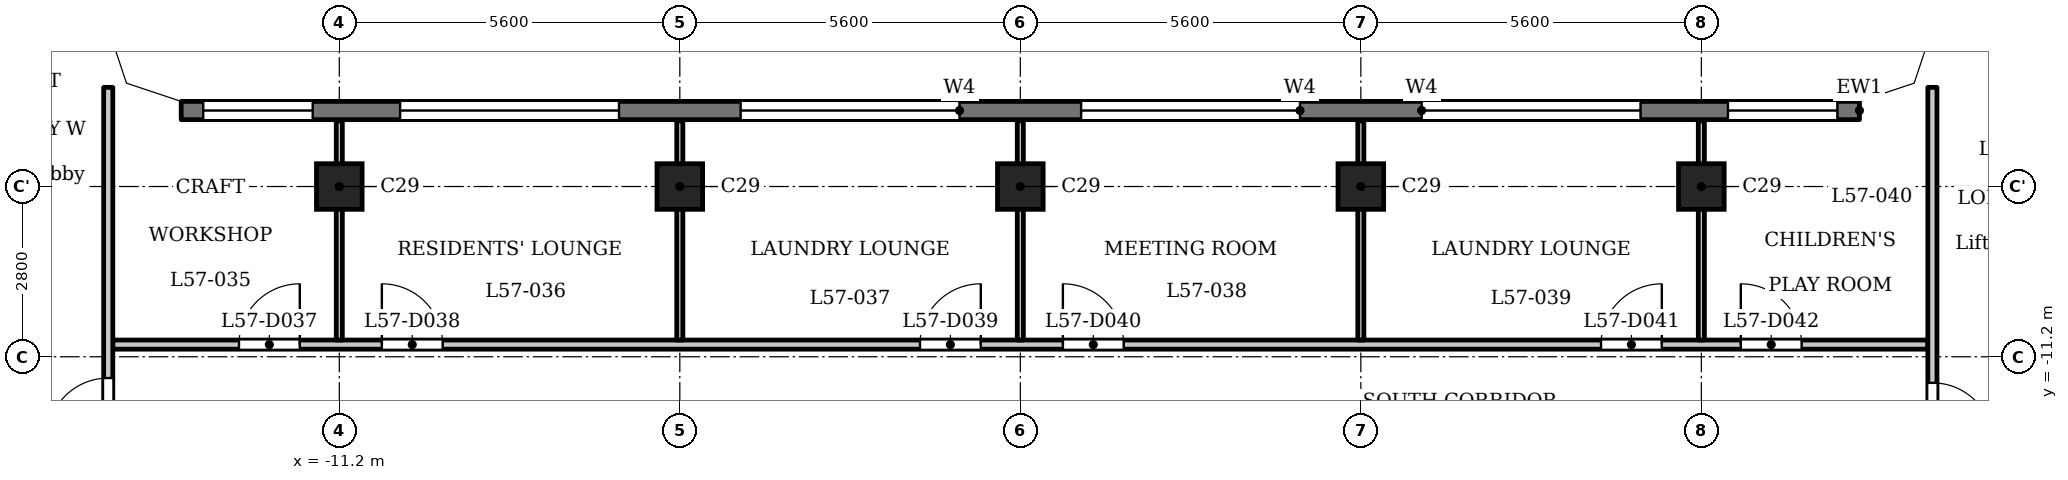
"""IFC4 building model, lengths in metres.
Left out: names, types, materials, properties, quantities, classifications, styles, units other than length and angle.
Written with IfcOpenShell. Run it as: python <this file> out.ifc"""

import sys

from ifc_helpers import new_model, si_unit, direction, frame, frame_2d, origin, origin_2d, place, context, subcontext, project, spatial, polyline, rectangle, outline, extrude, element, fill, save


model = new_model("IFC4")
c1 = context("Model", 3, precision=1e-05, world=origin(), true_north=direction((0.0, 1.0)))
c2 = subcontext(c1, "Body", "Model", "MODEL_VIEW")
j1 = project(units=[si_unit("LENGTHUNIT", "METRE"), si_unit("PLANEANGLEUNIT", "RADIAN")], contexts=[c1])
p1 = place(None, origin())
s1 = spatial("IfcSite", under=j1, at=p1, CompositionType="ELEMENT")
p2 = place(p1, origin())
s2 = spatial("IfcBuilding", under=s1, at=p2, CompositionType="ELEMENT")
p3 = place(p2, frame((0.0, 0.0, 220.4)))
s3 = spatial("IfcBuildingStorey", under=s2, at=p3, CompositionType="ELEMENT", Elevation=220.4)
for number, where, z_axis, x_axis in (
    (1, (-11.2, -8.4, 0.0), (0.0, 0.0, 1.0), (1.0, 0.0, 0.0)),
    (2, (-5.6, -8.4, 0.0), (0.0, 0.0, 1.0), (1.0, 0.0, 0.0)),
    (3, (0.0, -8.4, 0.0), (0.0, 0.0, 1.0), (1.0, 0.0, 0.0)),
    (4, (5.6, -8.4, 0.0), (0.0, 0.0, 1.0), (1.0, 0.0, 0.0)),
    (5, (11.2, -8.4, 0.0), (0.0, 0.0, 1.0), (1.0, 0.0, 0.0)),
):
    element("IfcColumn", number, at=place(p3, frame(where, z_axis=z_axis, x_axis=x_axis)), inside=s3, PredefinedType="COLUMN", context=c2, shape_type="SweptSolid", body=[
        extrude(rectangle(XDim=0.75, YDim=0.75, at=origin_2d()), origin(), (0.0, 0.0, 1.0), 3.5),
    ])
p4 = place(p3, frame((13.8, -7.15, 0.0), z_axis=(0.0, 0.0, 1.0), x_axis=(-1.0, 0.0, 0.0)))
e6 = element("IfcWall", 6, at=p4, inside=s3, PredefinedType="SOLIDWALL", context=c2, shape_type="SweptSolid", body=[
    extrude(rectangle(XDim=27.6, YDim=0.3, at=frame_2d((13.8, 0.0))), origin(), (0.0, 0.0, 1.0), 3.2),
])
p5 = place(p4, frame((0.363, 0.0, 0.9)))
e7 = element("IfcOpeningElement", 7, at=p5, cuts=e6, PredefinedType="OPENING", context=c2, shape_type="SweptSolid", body=[
    extrude(rectangle(XDim=1.8, YDim=1.25, at=frame_2d((0.9, 0.625))), frame((0.0, 0.16, 0.0), z_axis=(0.0, -1.0, 0.0), x_axis=(1.0, 0.0, 0.0)), (0.0, 0.0, 1.0), 0.32),
])
p6 = place(p4, frame((3.6, 0.0, 1.2)))
e8 = element("IfcOpeningElement", 8, at=p6, cuts=e6, PredefinedType="OPENING", context=c2, shape_type="SweptSolid", body=[
    extrude(rectangle(XDim=3.6, YDim=0.95, at=frame_2d((1.8, 0.475))), frame((0.0, 0.16, 0.0), z_axis=(0.0, -1.0, 0.0), x_axis=(1.0, 0.0, 0.0)), (0.0, 0.0, 1.0), 0.32),
])
p7 = place(p4, frame((9.2, 0.0, 1.2)))
e9 = element("IfcOpeningElement", 9, at=p7, cuts=e6, PredefinedType="OPENING", context=c2, shape_type="SweptSolid", body=[
    extrude(rectangle(XDim=3.6, YDim=0.95, at=frame_2d((1.8, 0.475))), frame((0.0, 0.16, 0.0), z_axis=(0.0, -1.0, 0.0), x_axis=(1.0, 0.0, 0.0)), (0.0, 0.0, 1.0), 0.32),
])
p8 = place(p4, frame((14.8, 0.0, 1.2)))
e10 = element("IfcOpeningElement", 10, at=p8, cuts=e6, PredefinedType="OPENING", context=c2, shape_type="SweptSolid", body=[
    extrude(rectangle(XDim=3.6, YDim=0.95, at=frame_2d((1.8, 0.475))), frame((0.0, 0.16, 0.0), z_axis=(0.0, -1.0, 0.0), x_axis=(1.0, 0.0, 0.0)), (0.0, 0.0, 1.0), 0.32),
])
p9 = place(p4, frame((20.4, 0.0, 1.2)))
e11 = element("IfcOpeningElement", 11, at=p9, cuts=e6, PredefinedType="OPENING", context=c2, shape_type="SweptSolid", body=[
    extrude(rectangle(XDim=3.6, YDim=0.95, at=frame_2d((1.8, 0.475))), frame((0.0, 0.16, 0.0), z_axis=(0.0, -1.0, 0.0), x_axis=(1.0, 0.0, 0.0)), (0.0, 0.0, 1.0), 0.32),
])
p10 = place(p4, frame((25.438, 0.0, 0.9)))
e12 = element("IfcOpeningElement", 12, at=p10, cuts=e6, PredefinedType="OPENING", context=c2, shape_type="SweptSolid", body=[
    extrude(rectangle(XDim=1.8, YDim=1.25, at=frame_2d((0.9, 0.625))), frame((0.0, 0.16, 0.0), z_axis=(0.0, -1.0, 0.0), x_axis=(1.0, 0.0, 0.0)), (0.0, 0.0, 1.0), 0.32),
])
p11 = place(p3, frame((-14.925, -11.0, 0.0), z_axis=(0.0, 0.0, 1.0), x_axis=(1.0, 0.0, 0.0)))
e13 = element("IfcWall", 13, at=p11, inside=s3, PredefinedType="PARTITIONING", context=c2, shape_type="SweptSolid", body=[
    extrude(rectangle(XDim=29.85, YDim=0.15, at=frame_2d((14.925, 0.0))), origin(), (0.0, 0.0, 1.0), 3.2),
])
p12 = place(p11, frame((2.075, 0.0, 0.0)))
e14 = element("IfcOpeningElement", 14, at=p12, cuts=e13, PredefinedType="OPENING", context=c2, shape_type="SweptSolid", body=[
    extrude(rectangle(XDim=1.0, YDim=2.1, at=frame_2d((0.5, 1.05))), frame((0.0, 0.085, 0.0), z_axis=(0.0, -1.0, 0.0), x_axis=(1.0, 0.0, 0.0)), (0.0, 0.0, 1.0), 0.17),
])
p13 = place(p11, frame((4.425, 0.0, 0.0)))
e15 = element("IfcOpeningElement", 15, at=p13, cuts=e13, PredefinedType="OPENING", context=c2, shape_type="SweptSolid", body=[
    extrude(rectangle(XDim=1.0, YDim=2.1, at=frame_2d((0.5, 1.05))), frame((0.0, 0.085, 0.0), z_axis=(0.0, -1.0, 0.0), x_axis=(1.0, 0.0, 0.0)), (0.0, 0.0, 1.0), 0.17),
])
p14 = place(p11, frame((13.275, 0.0, 0.0)))
e16 = element("IfcOpeningElement", 16, at=p14, cuts=e13, PredefinedType="OPENING", context=c2, shape_type="SweptSolid", body=[
    extrude(rectangle(XDim=1.0, YDim=2.1, at=frame_2d((0.5, 1.05))), frame((0.0, 0.085, 0.0), z_axis=(0.0, -1.0, 0.0), x_axis=(1.0, 0.0, 0.0)), (0.0, 0.0, 1.0), 0.17),
])
p15 = place(p11, frame((15.625, 0.0, 0.0)))
e17 = element("IfcOpeningElement", 17, at=p15, cuts=e13, PredefinedType="OPENING", context=c2, shape_type="SweptSolid", body=[
    extrude(rectangle(XDim=1.0, YDim=2.1, at=frame_2d((0.5, 1.05))), frame((0.0, 0.085, 0.0), z_axis=(0.0, -1.0, 0.0), x_axis=(1.0, 0.0, 0.0)), (0.0, 0.0, 1.0), 0.17),
])
p16 = place(p11, frame((24.475, 0.0, 0.0)))
e18 = element("IfcOpeningElement", 18, at=p16, cuts=e13, PredefinedType="OPENING", context=c2, shape_type="SweptSolid", body=[
    extrude(rectangle(XDim=1.0, YDim=2.1, at=frame_2d((0.5, 1.05))), frame((0.0, 0.085, 0.0), z_axis=(0.0, -1.0, 0.0), x_axis=(1.0, 0.0, 0.0)), (0.0, 0.0, 1.0), 0.17),
])
p17 = place(p11, frame((26.774, 0.0, 0.0)))
e19 = element("IfcOpeningElement", 19, at=p17, cuts=e13, PredefinedType="OPENING", context=c2, shape_type="SweptSolid", body=[
    extrude(rectangle(XDim=1.0, YDim=2.1, at=frame_2d((0.5, 1.05))), frame((0.0, 0.085, 0.0), z_axis=(0.0, -1.0, 0.0), x_axis=(1.0, 0.0, 0.0)), (0.0, 0.0, 1.0), 0.17),
])
p18 = place(p3, frame((-15.0, -13.125, 0.0), z_axis=(0.0, 0.0, 1.0), x_axis=(0.0, 1.0, 0.0)))
e20 = element("IfcWall", 20, at=p18, inside=s3, PredefinedType="PARTITIONING", context=c2, shape_type="SweptSolid", body=[
    extrude(rectangle(XDim=6.356, YDim=0.15, at=frame_2d((3.178, 0.0))), origin(), (0.0, 0.0, 1.0), 3.2),
])
p19 = place(p18, frame((0.575, 0.0, 0.0)))
e21 = element("IfcOpeningElement", 21, at=p19, cuts=e20, PredefinedType="OPENING", context=c2, shape_type="SweptSolid", body=[
    extrude(rectangle(XDim=1.0, YDim=2.1, at=frame_2d((0.5, 1.05))), frame((0.0, 0.085, 0.0), z_axis=(0.0, -1.0, 0.0), x_axis=(1.0, 0.0, 0.0)), (0.0, 0.0, 1.0), 0.17),
])
for number, where, z_axis, x_axis in (
    (22, (-11.2, -10.925, 0.0), (0.0, 0.0, 1.0), (0.0, 1.0, 0.0)),
    (23, (-5.6, -10.925, 0.0), (0.0, 0.0, 1.0), (0.0, 1.0, 0.0)),
    (24, (0.0, -10.925, 0.0), (0.0, 0.0, 1.0), (0.0, 1.0, 0.0)),
    (25, (5.6, -10.925, 0.0), (0.0, 0.0, 1.0), (0.0, 1.0, 0.0)),
    (26, (11.2, -10.925, 0.0), (0.0, 0.0, 1.0), (0.0, 1.0, 0.0)),
):
    element("IfcWall", number, at=place(p3, frame(where, z_axis=z_axis, x_axis=x_axis)), inside=s3, PredefinedType="PARTITIONING", context=c2, shape_type="SweptSolid", body=[
        extrude(rectangle(XDim=3.605, YDim=0.1, at=frame_2d((1.802, 0.0))), origin(), (0.0, 0.0, 1.0), 3.2),
    ])
p20 = place(p3, frame((15.0, -13.125, 0.0), z_axis=(0.0, 0.0, 1.0), x_axis=(0.0, 1.0, 0.0)))
e27 = element("IfcWall", 27, at=p20, inside=s3, PredefinedType="PARTITIONING", context=c2, shape_type="SweptSolid", body=[
    extrude(rectangle(XDim=6.356, YDim=0.15, at=frame_2d((3.178, 0.0))), origin(), (0.0, 0.0, 1.0), 3.2),
])
p21 = place(p20, frame((0.496, 0.0, 0.0)))
e28 = element("IfcOpeningElement", 28, at=p21, cuts=e27, PredefinedType="OPENING", context=c2, shape_type="SweptSolid", body=[
    extrude(rectangle(XDim=1.0, YDim=2.1, at=frame_2d((0.5, 1.05))), frame((0.0, 0.085, 0.0), z_axis=(0.0, -1.0, 0.0), x_axis=(1.0, 0.0, 0.0)), (0.0, 0.0, 1.0), 0.17),
])
p22 = place(p3, origin())
e29 = element("IfcWall", 29, at=p22, inside=s3, PredefinedType="SOLIDWALL", context=c2, shape_type="SweptSolid", body=[
    extrude(outline(polyline([(14.937, -6.937), (15.3, -5.849), (15.3, -5.8), (15.0, -5.8), (14.7, -6.7), (13.8, -7.0), (13.8, -7.3), (13.849, -7.3), (14.937, -6.937)])), origin(), (0.0, 0.0, 1.0), 3.2),
])
e30 = element("IfcWall", 30, at=p22, inside=s3, PredefinedType="SOLIDWALL", context=c2, shape_type="SweptSolid", body=[
    extrude(outline(polyline([(-14.937, -6.937), (-13.849, -7.3), (-13.8, -7.3), (-13.8, -7.0), (-14.7, -6.7), (-15.0, -5.8), (-15.3, -5.8), (-15.3, -5.849), (-14.937, -6.937)])), origin(), (0.0, 0.0, 1.0), 3.2),
])
p23 = place(p19, origin())
e31 = element("IfcDoor", 31, at=p23, inside=s3, OperationType="SINGLE_SWING_RIGHT", PredefinedType="DOOR", context=c2, shape_type="SweptSolid", body=[
    extrude(rectangle(XDim=1.0, YDim=2.1, at=frame_2d((0.5, 1.05))), frame((0.0, 0.025, 0.0), z_axis=(0.0, -1.0, 0.0), x_axis=(1.0, 0.0, 0.0)), (0.0, 0.0, 1.0), 0.05),
])
fill(e21, e31)
p24 = place(p21, origin())
e32 = element("IfcDoor", 32, at=p24, inside=s3, OperationType="SINGLE_SWING_LEFT", PredefinedType="DOOR", context=c2, shape_type="SweptSolid", body=[
    extrude(rectangle(XDim=1.0, YDim=2.1, at=frame_2d((0.5, 1.05))), frame((0.0, 0.025, 0.0), z_axis=(0.0, -1.0, 0.0), x_axis=(1.0, 0.0, 0.0)), (0.0, 0.0, 1.0), 0.05),
])
fill(e28, e32)
p25 = place(p12, origin())
e33 = element("IfcDoor", 33, at=p25, inside=s3, OperationType="SINGLE_SWING_LEFT", PredefinedType="DOOR", context=c2, shape_type="SweptSolid", body=[
    extrude(rectangle(XDim=1.0, YDim=2.1, at=frame_2d((0.5, 1.05))), frame((0.0, 0.025, 0.0), z_axis=(0.0, -1.0, 0.0), x_axis=(1.0, 0.0, 0.0)), (0.0, 0.0, 1.0), 0.05),
])
fill(e14, e33)
p26 = place(p13, origin())
e34 = element("IfcDoor", 34, at=p26, inside=s3, OperationType="SINGLE_SWING_RIGHT", PredefinedType="DOOR", context=c2, shape_type="SweptSolid", body=[
    extrude(rectangle(XDim=1.0, YDim=2.1, at=frame_2d((0.5, 1.05))), frame((0.0, 0.025, 0.0), z_axis=(0.0, -1.0, 0.0), x_axis=(1.0, 0.0, 0.0)), (0.0, 0.0, 1.0), 0.05),
])
fill(e15, e34)
p27 = place(p14, origin())
e35 = element("IfcDoor", 35, at=p27, inside=s3, OperationType="SINGLE_SWING_LEFT", PredefinedType="DOOR", context=c2, shape_type="SweptSolid", body=[
    extrude(rectangle(XDim=1.0, YDim=2.1, at=frame_2d((0.5, 1.05))), frame((0.0, 0.025, 0.0), z_axis=(0.0, -1.0, 0.0), x_axis=(1.0, 0.0, 0.0)), (0.0, 0.0, 1.0), 0.05),
])
fill(e16, e35)
p28 = place(p15, origin())
e36 = element("IfcDoor", 36, at=p28, inside=s3, OperationType="SINGLE_SWING_RIGHT", PredefinedType="DOOR", context=c2, shape_type="SweptSolid", body=[
    extrude(rectangle(XDim=1.0, YDim=2.1, at=frame_2d((0.5, 1.05))), frame((0.0, 0.025, 0.0), z_axis=(0.0, -1.0, 0.0), x_axis=(1.0, 0.0, 0.0)), (0.0, 0.0, 1.0), 0.05),
])
fill(e17, e36)
p29 = place(p16, origin())
e37 = element("IfcDoor", 37, at=p29, inside=s3, OperationType="SINGLE_SWING_LEFT", PredefinedType="DOOR", context=c2, shape_type="SweptSolid", body=[
    extrude(rectangle(XDim=1.0, YDim=2.1, at=frame_2d((0.5, 1.05))), frame((0.0, 0.025, 0.0), z_axis=(0.0, -1.0, 0.0), x_axis=(1.0, 0.0, 0.0)), (0.0, 0.0, 1.0), 0.05),
])
fill(e18, e37)
p30 = place(p17, origin())
e38 = element("IfcDoor", 38, at=p30, inside=s3, OperationType="SINGLE_SWING_RIGHT", PredefinedType="DOOR", context=c2, shape_type="SweptSolid", body=[
    extrude(rectangle(XDim=1.0, YDim=2.1, at=frame_2d((0.5, 1.05))), frame((0.0, 0.025, 0.0), z_axis=(0.0, -1.0, 0.0), x_axis=(1.0, 0.0, 0.0)), (0.0, 0.0, 1.0), 0.05),
])
fill(e19, e38)
p31 = place(p5, origin())
e39 = element("IfcWindow", 39, at=p31, inside=s3, PartitioningType="SINGLE_PANEL", PredefinedType="WINDOW", context=c2, shape_type="SweptSolid", body=[
    extrude(rectangle(XDim=1.8, YDim=1.25, at=frame_2d((0.9, 0.625))), frame((0.0, 0.03, 0.0), z_axis=(0.0, -1.0, 0.0), x_axis=(1.0, 0.0, 0.0)), (0.0, 0.0, 1.0), 0.06),
])
fill(e7, e39)
p32 = place(p6, origin())
e40 = element("IfcWindow", 40, at=p32, inside=s3, PartitioningType="SINGLE_PANEL", PredefinedType="WINDOW", context=c2, shape_type="SweptSolid", body=[
    extrude(rectangle(XDim=3.6, YDim=0.95, at=frame_2d((1.8, 0.475))), frame((0.0, 0.03, 0.0), z_axis=(0.0, -1.0, 0.0), x_axis=(1.0, 0.0, 0.0)), (0.0, 0.0, 1.0), 0.06),
])
fill(e8, e40)
p33 = place(p7, origin())
e41 = element("IfcWindow", 41, at=p33, inside=s3, PartitioningType="SINGLE_PANEL", PredefinedType="WINDOW", context=c2, shape_type="SweptSolid", body=[
    extrude(rectangle(XDim=3.6, YDim=0.95, at=frame_2d((1.8, 0.475))), frame((0.0, 0.03, 0.0), z_axis=(0.0, -1.0, 0.0), x_axis=(1.0, 0.0, 0.0)), (0.0, 0.0, 1.0), 0.06),
])
fill(e9, e41)
p34 = place(p8, origin())
e42 = element("IfcWindow", 42, at=p34, inside=s3, PartitioningType="SINGLE_PANEL", PredefinedType="WINDOW", context=c2, shape_type="SweptSolid", body=[
    extrude(rectangle(XDim=3.6, YDim=0.95, at=frame_2d((1.8, 0.475))), frame((0.0, 0.03, 0.0), z_axis=(0.0, -1.0, 0.0), x_axis=(1.0, 0.0, 0.0)), (0.0, 0.0, 1.0), 0.06),
])
fill(e10, e42)
p35 = place(p9, origin())
e43 = element("IfcWindow", 43, at=p35, inside=s3, PartitioningType="SINGLE_PANEL", PredefinedType="WINDOW", context=c2, shape_type="SweptSolid", body=[
    extrude(rectangle(XDim=3.6, YDim=0.95, at=frame_2d((1.8, 0.475))), frame((0.0, 0.03, 0.0), z_axis=(0.0, -1.0, 0.0), x_axis=(1.0, 0.0, 0.0)), (0.0, 0.0, 1.0), 0.06),
])
fill(e11, e43)
p36 = place(p10, origin())
e44 = element("IfcWindow", 44, at=p36, inside=s3, PartitioningType="SINGLE_PANEL", PredefinedType="WINDOW", context=c2, shape_type="SweptSolid", body=[
    extrude(rectangle(XDim=1.8, YDim=1.25, at=frame_2d((0.9, 0.625))), frame((0.0, 0.03, 0.0), z_axis=(0.0, -1.0, 0.0), x_axis=(1.0, 0.0, 0.0)), (0.0, 0.0, 1.0), 0.06),
])
fill(e12, e44)
save(model, sys.argv[1])
